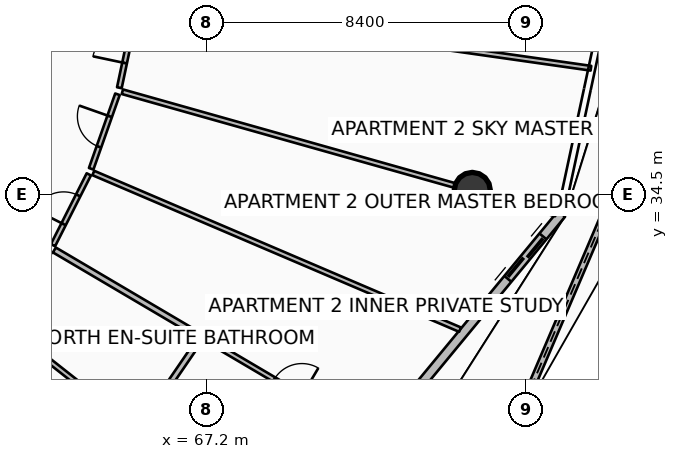
"""IFC4 building model, lengths in metres.
Left out: names, types, materials, properties, quantities, classifications, styles, units other than length and angle.
Written with IfcOpenShell. Run it as: python <this file> out.ifc"""

import sys

from ifc_helpers import new_model, si_unit, direction, frame, frame_2d, origin, origin_2d, place, context, subcontext, project, spatial, polyline, rectangle, circle, outline, extrude, element, fill, save


model = new_model("IFC4")
c1 = context("Model", 3, precision=1e-05, world=origin(), true_north=direction((0.0, 1.0)))
c2 = subcontext(c1, "Body", "Model", "MODEL_VIEW")
j1 = project(units=[si_unit("LENGTHUNIT", "METRE"), si_unit("PLANEANGLEUNIT", "RADIAN")], contexts=[c1])
p1 = place(None, origin())
s1 = spatial("IfcSite", under=j1, at=p1, CompositionType="ELEMENT")
p2 = place(p1, origin())
s2 = spatial("IfcBuilding", under=s1, at=p2, CompositionType="ELEMENT")
p3 = place(p2, frame((0.0, 0.0, 290.6)))
s3 = spatial("IfcBuildingStorey", under=s2, at=p3, CompositionType="ELEMENT", Elevation=290.6)
p4 = place(p3, frame((74.191, 34.613, 0.0), z_axis=(0.0, 0.0, 1.0), x_axis=(1.0, 0.0, 0.0)))
e1 = element("IfcColumn", 1, at=p4, inside=s3, PredefinedType="COLUMN", context=c2, shape_type="SweptSolid", body=[
    extrude(circle(Radius=0.475, at=origin_2d()), origin(), (0.0, 0.0, 1.0), 3.59),
])
p5 = place(p3, frame((75.235, 28.258, 0.0), z_axis=(0.0, 0.0, 1.0), x_axis=(0.392715313702, 0.919660090677, 0.0)))
e2 = element("IfcWall", 2, at=p5, inside=s3, PredefinedType="PARAPET", context=c2, shape_type="SweptSolid", body=[
    extrude(outline(polyline([(0.0, 0.0), (11.995, 0.0), (11.995, 1.12), (5.998, 1.182), (0.0, 1.348), (0.0, 0.0)])), frame((0.0, 0.09, 0.0), z_axis=(0.0, -1.0, 0.0), x_axis=(1.0, 0.0, 0.0)), (0.0, 0.0, 1.0), 0.18),
])
p6 = place(p3, frame((69.258, 25.178, 0.0), z_axis=(0.0, 0.0, 1.0), x_axis=(0.636680093065, 0.771128043255, 0.0)))
e3 = element("IfcWall", 3, at=p6, inside=s3, PredefinedType="SOLIDWALL", context=c2, shape_type="SweptSolid", body=[
    extrude(rectangle(XDim=11.438, YDim=0.24, at=frame_2d((5.719, 0.0))), origin(), (0.0, 0.0, 1.0), 2.54),
])
p7 = place(p6, frame((9.218, 0.0, 0.0)))
e4 = element("IfcOpeningElement", 4, at=p7, cuts=e3, PredefinedType="OPENING", context=c2, shape_type="SweptSolid", body=[
    extrude(rectangle(XDim=1.45, YDim=2.15, at=frame_2d((0.725, 1.075))), frame((0.0, 0.13, 0.0), z_axis=(0.0, -1.0, 0.0), x_axis=(1.0, 0.0, 0.0)), (0.0, 0.0, 1.0), 0.26),
])
p8 = place(p6, frame((0.28, 0.0, 0.65)))
e5 = element("IfcOpeningElement", 5, at=p8, cuts=e3, PredefinedType="OPENING", context=c2, shape_type="SweptSolid", body=[
    extrude(rectangle(XDim=1.6, YDim=1.5, at=frame_2d((0.8, 0.75))), frame((0.0, 0.13, 0.0), z_axis=(0.0, -1.0, 0.0), x_axis=(1.0, 0.0, 0.0)), (0.0, 0.0, 1.0), 0.26),
])
p9 = place(p3, frame((61.858, 31.075, 0.0), z_axis=(0.0, 0.0, 1.0), x_axis=(0.785325513659, -0.619083061952, 0.0)))
e6 = element("IfcWall", 6, at=p9, inside=s3, PredefinedType="PARTITIONING", context=c2, shape_type="SweptSolid", body=[
    extrude(rectangle(XDim=9.438, YDim=0.125, at=frame_2d((4.719, 0.0))), origin(), (0.0, 0.0, 1.0), 2.957),
])
p10 = place(p3, frame((65.44, 28.378, 0.0), z_axis=(0.0, 0.0, 1.0), x_axis=(0.564687043446, 0.82530512113, 0.0)))
e7 = element("IfcWall", 7, at=p10, inside=s3, PredefinedType="PARTITIONING", context=c2, shape_type="SweptSolid", body=[
    extrude(rectangle(XDim=2.798, YDim=0.15, at=frame_2d((1.399, 0.0))), origin(), (0.0, 0.0, 1.0), 2.957),
])
p11 = place(p3, frame((63.194, 33.046, 0.0), z_axis=(0.0, 0.0, 1.0), x_axis=(0.8615329034, -0.507701739566, 0.0)))
e8 = element("IfcWall", 8, at=p11, inside=s3, PredefinedType="PARTITIONING", context=c2, shape_type="SweptSolid", body=[
    extrude(rectangle(XDim=4.46, YDim=0.15, at=frame_2d((2.23, 0.0))), origin(), (0.0, 0.0, 1.0), 3.03),
])
p12 = place(p3, frame((67.149, 30.716, 0.0), z_axis=(0.0, 0.0, 1.0), x_axis=(0.861535840118, -0.507696756136, 0.0)))
e9 = element("IfcWall", 9, at=p12, inside=s3, PredefinedType="PARTITIONING", context=c2, shape_type="SweptSolid", body=[
    extrude(rectangle(XDim=5.092, YDim=0.125, at=frame_2d((2.546, 0.0))), origin(), (0.0, 0.0, 1.0), 3.03),
])
p13 = place(p12, frame((2.121, 0.0, 0.0)))
e10 = element("IfcOpeningElement", 10, at=p13, cuts=e9, PredefinedType="OPENING", context=c2, shape_type="SweptSolid", body=[
    extrude(rectangle(XDim=0.85, YDim=2.06, at=frame_2d((0.425, 1.03))), frame((0.0, 0.073, 0.0), z_axis=(0.0, -1.0, 0.0), x_axis=(1.0, 0.0, 0.0)), (0.0, 0.0, 1.0), 0.145),
])
p14 = place(p3, frame((64.219, 35.072, 0.0), z_axis=(0.0, 0.0, 1.0), x_axis=(0.91961011962, -0.392832315235, 0.0)))
e11 = element("IfcWall", 11, at=p14, inside=s3, PredefinedType="PARTITIONING", context=c2, shape_type="SweptSolid", body=[
    extrude(rectangle(XDim=10.493, YDim=0.125, at=frame_2d((5.247, 0.0))), origin(), (0.0, 0.0, 1.0), 3.03),
])
p15 = place(p3, frame((63.157, 33.172, 0.0), z_axis=(0.0, 0.0, 1.0), x_axis=(0.451230403471, 0.892407487073, 0.0)))
e12 = element("IfcWall", 12, at=p15, inside=s3, PredefinedType="PARTITIONING", context=c2, shape_type="SweptSolid", body=[
    extrude(rectangle(XDim=2.088, YDim=0.125, at=frame_2d((1.044, 0.0))), origin(), (0.0, 0.0, 1.0), 3.03),
])
p16 = place(p15, frame((0.619, 0.0, 0.0)))
e13 = element("IfcOpeningElement", 13, at=p16, cuts=e12, PredefinedType="OPENING", context=c2, shape_type="SweptSolid", body=[
    extrude(rectangle(XDim=0.85, YDim=2.06, at=frame_2d((0.425, 1.03))), frame((0.0, 0.073, 0.0), z_axis=(0.0, -1.0, 0.0), x_axis=(1.0, 0.0, 0.0)), (0.0, 0.0, 1.0), 0.145),
])
p17 = place(p3, frame((64.162, 35.183, 0.0), z_axis=(0.0, 0.0, 1.0), x_axis=(0.332881557629, 0.942968646664, 0.0)))
e14 = element("IfcWall", 14, at=p17, inside=s3, PredefinedType="PARTITIONING", context=c2, shape_type="SweptSolid", body=[
    extrude(rectangle(XDim=2.079, YDim=0.125, at=frame_2d((1.039, 0.0))), origin(), (0.0, 0.0, 1.0), 2.957),
])
p18 = place(p17, frame((0.614, 0.0, 0.0)))
e15 = element("IfcOpeningElement", 15, at=p18, cuts=e14, PredefinedType="OPENING", context=c2, shape_type="SweptSolid", body=[
    extrude(rectangle(XDim=0.85, YDim=2.06, at=frame_2d((0.425, 1.03))), frame((0.0, 0.073, 0.0), z_axis=(0.0, -1.0, 0.0), x_axis=(1.0, 0.0, 0.0)), (0.0, 0.0, 1.0), 0.145),
])
p19 = place(p3, frame((64.983, 37.21, 0.0), z_axis=(0.0, 0.0, 1.0), x_axis=(0.962453678557, -0.271445973691, 0.0)))
e16 = element("IfcWall", 16, at=p19, inside=s3, PredefinedType="PARTITIONING", context=c2, shape_type="SweptSolid", body=[
    extrude(rectangle(XDim=11.85, YDim=0.125, at=frame_2d((5.925, 0.0))), origin(), (0.0, 0.0, 1.0), 2.957),
])
p20 = place(p3, frame((65.46, 39.515, 0.0), z_axis=(0.0, 0.0, 1.0), x_axis=(0.990024400928, -0.140896009764, 0.0)))
e17 = element("IfcWall", 17, at=p20, inside=s3, PredefinedType="PARTITIONING", context=c2, shape_type="SweptSolid", body=[
    extrude(rectangle(XDim=11.972, YDim=0.125, at=frame_2d((5.986, 0.0))), origin(), (0.0, 0.0, 1.0), 3.03),
])
p21 = place(p3, frame((64.904, 37.316, 0.0), z_axis=(0.0, 0.0, 1.0), x_axis=(0.206653610436, 0.978414168588, 0.0)))
e18 = element("IfcWall", 18, at=p21, inside=s3, PredefinedType="PARTITIONING", context=c2, shape_type="SweptSolid", body=[
    extrude(rectangle(XDim=2.181, YDim=0.125, at=frame_2d((1.09, 0.0))), origin(), (0.0, 0.0, 1.0), 2.957),
])
p22 = place(p21, frame((0.665, 0.0, 0.0)))
e19 = element("IfcOpeningElement", 19, at=p22, cuts=e18, PredefinedType="OPENING", context=c2, shape_type="SweptSolid", body=[
    extrude(rectangle(XDim=0.85, YDim=2.06, at=frame_2d((0.425, 1.03))), frame((0.0, 0.073, 0.0), z_axis=(0.0, -1.0, 0.0), x_axis=(1.0, 0.0, 0.0)), (0.0, 0.0, 1.0), 0.145),
])
p23 = place(p7, origin())
e20 = element("IfcDoor", 20, at=p23, inside=s3, OperationType="DOUBLE_DOOR_SLIDING", PredefinedType="DOOR", context=c2, shape_type="SweptSolid", body=[
    extrude(rectangle(XDim=1.45, YDim=2.15, at=frame_2d((0.725, 1.075))), frame((0.0, 0.025, 0.0), z_axis=(0.0, -1.0, 0.0), x_axis=(1.0, 0.0, 0.0)), (0.0, 0.0, 1.0), 0.05),
])
fill(e4, e20)
p24 = place(p13, origin())
e21 = element("IfcDoor", 21, at=p24, inside=s3, OperationType="SINGLE_SWING_RIGHT", PredefinedType="DOOR", context=c2, shape_type="SweptSolid", body=[
    extrude(rectangle(XDim=0.85, YDim=2.06, at=frame_2d((0.425, 1.03))), frame((0.0, 0.025, 0.0), z_axis=(0.0, -1.0, 0.0), x_axis=(1.0, 0.0, 0.0)), (0.0, 0.0, 1.0), 0.05),
])
fill(e10, e21)
p25 = place(p16, origin())
e22 = element("IfcDoor", 22, at=p25, inside=s3, OperationType="SINGLE_SWING_LEFT", PredefinedType="DOOR", context=c2, shape_type="SweptSolid", body=[
    extrude(rectangle(XDim=0.85, YDim=2.06, at=frame_2d((0.425, 1.03))), frame((0.0, 0.025, 0.0), z_axis=(0.0, -1.0, 0.0), x_axis=(1.0, 0.0, 0.0)), (0.0, 0.0, 1.0), 0.05),
])
fill(e13, e22)
p26 = place(p18, origin())
e23 = element("IfcDoor", 23, at=p26, inside=s3, OperationType="SINGLE_SWING_RIGHT", PredefinedType="DOOR", context=c2, shape_type="SweptSolid", body=[
    extrude(rectangle(XDim=0.85, YDim=2.06, at=frame_2d((0.425, 1.03))), frame((0.0, 0.025, 0.0), z_axis=(0.0, -1.0, 0.0), x_axis=(1.0, 0.0, 0.0)), (0.0, 0.0, 1.0), 0.05),
])
fill(e15, e23)
p27 = place(p22, origin())
e24 = element("IfcDoor", 24, at=p27, inside=s3, OperationType="SINGLE_SWING_LEFT", PredefinedType="DOOR", context=c2, shape_type="SweptSolid", body=[
    extrude(rectangle(XDim=0.85, YDim=2.06, at=frame_2d((0.425, 1.03))), frame((0.0, 0.025, 0.0), z_axis=(0.0, -1.0, 0.0), x_axis=(1.0, 0.0, 0.0)), (0.0, 0.0, 1.0), 0.05),
])
fill(e19, e24)
save(model, sys.argv[1])
